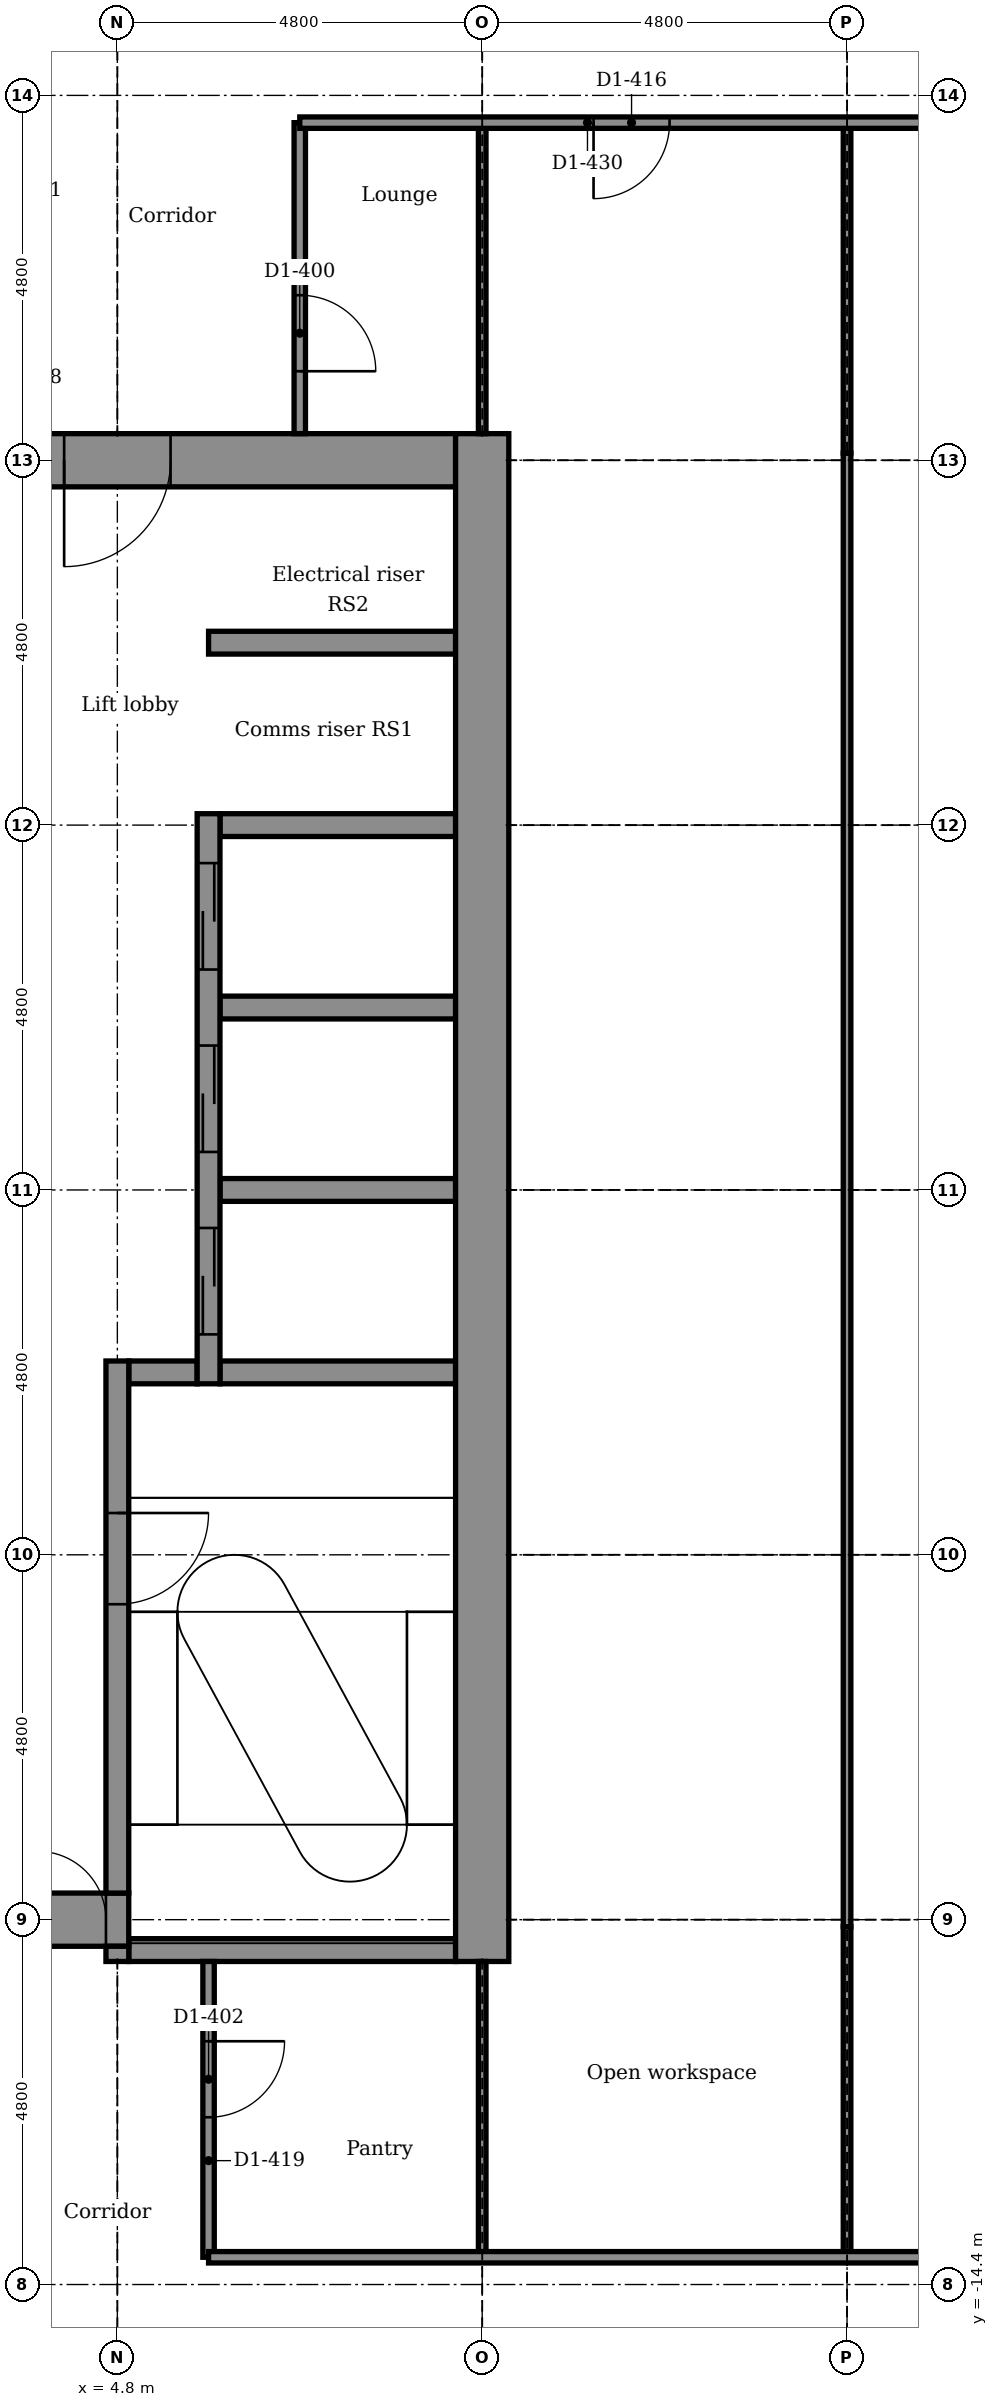
"""IFC4 building model, lengths in metres.
Left out: names, types, materials, properties, quantities, classifications, styles, units other than length and angle.
Written with IfcOpenShell. Run it as: python <this file> out.ifc"""

import sys

from ifc_helpers import new_model, si_unit, direction, frame, frame_2d, origin, place, context, subcontext, project, spatial, rectangle, extrude, element, fill, save


model = new_model("IFC4")
c1 = context("Model", 3, precision=1e-05, world=origin(), true_north=direction((0.0, 1.0)))
c2 = subcontext(c1, "Body", "Model", "MODEL_VIEW")
j1 = project(units=[si_unit("LENGTHUNIT", "METRE"), si_unit("PLANEANGLEUNIT", "RADIAN")], contexts=[c1])
p1 = place(None, origin())
s1 = spatial("IfcSite", under=j1, at=p1, CompositionType="ELEMENT")
p2 = place(p1, origin())
s2 = spatial("IfcBuilding", under=s1, at=p2, CompositionType="ELEMENT")
p3 = place(p2, frame((0.0, 0.0, 138.8)))
s3 = spatial("IfcBuildingStorey", under=s2, at=p3, CompositionType="ELEMENT", Elevation=138.8)
p4 = place(p3, frame((4.95, -10.0, -0.15), z_axis=(0.0, 0.0, 1.0), x_axis=(1.0, 0.0, 0.0)))
e1 = element("IfcWall", 1, at=p4, inside=s3, PredefinedType="STANDARD", context=c2, shape_type="SweptSolid", body=[
    extrude(rectangle(XDim=4.3, YDim=0.3, at=frame_2d((2.15, 0.0))), origin(), (0.0, 0.0, 1.0), 3.9),
])
p5 = place(p3, frame((-5.25, -9.6, -0.15), z_axis=(0.0, 0.0, 1.0), x_axis=(1.0, 0.0, 0.0)))
e2 = element("IfcWall", 2, at=p5, inside=s3, PredefinedType="SHEAR", context=c2, shape_type="SweptSolid", body=[
    extrude(rectangle(XDim=10.2, YDim=0.7, at=frame_2d((5.1, 0.0))), origin(), (0.0, 0.0, 1.0), 3.9),
])
p6 = place(p5, frame((9.0, 0.0, 0.15)))
e3 = element("IfcOpeningElement", 3, at=p6, cuts=e2, PredefinedType="OPENING", context=c2, shape_type="SweptSolid", body=[
    extrude(rectangle(XDim=0.9, YDim=2.1, at=frame_2d((0.45, 1.05))), frame((0.0, 0.36, 0.0), z_axis=(0.0, -1.0, 0.0), x_axis=(1.0, 0.0, 0.0)), (0.0, 0.0, 1.0), 0.72),
])
p7 = place(p3, frame((4.95, -2.4, -0.15), z_axis=(0.0, 0.0, 1.0), x_axis=(1.0, 0.0, 0.0)))
e4 = element("IfcWall", 4, at=p7, inside=s3, PredefinedType="STANDARD", context=c2, shape_type="SweptSolid", body=[
    extrude(rectangle(XDim=0.9, YDim=0.3, at=frame_2d((0.45, 0.0))), origin(), (0.0, 0.0, 1.0), 3.9),
])
for number, where, z_axis, x_axis in (
    (5, (6.15, -2.4, -0.15), (0.0, 0.0, 1.0), (1.0, 0.0, 0.0)),
    (6, (6.15, 0.0, -0.15), (0.0, 0.0, 1.0), (1.0, 0.0, 0.0)),
    (7, (6.15, 2.4, -0.15), (0.0, 0.0, 1.0), (1.0, 0.0, 0.0)),
    (8, (6.15, 4.8, -0.15), (0.0, 0.0, 1.0), (1.0, 0.0, 0.0)),
):
    element("IfcWall", number, at=place(p3, frame(where, z_axis=z_axis, x_axis=x_axis)), inside=s3, PredefinedType="STANDARD", context=c2, shape_type="SweptSolid", body=[
        extrude(rectangle(XDim=3.1, YDim=0.3, at=frame_2d((1.55, 0.0))), origin(), (0.0, 0.0, 1.0), 3.9),
    ])
p8 = place(p3, frame((6.0, 7.2, -0.15), z_axis=(0.0, 0.0, 1.0), x_axis=(1.0, 0.0, 0.0)))
e9 = element("IfcWall", 9, at=p8, inside=s3, PredefinedType="STANDARD", context=c2, shape_type="SweptSolid", body=[
    extrude(rectangle(XDim=3.25, YDim=0.3, at=frame_2d((1.625, 0.0))), origin(), (0.0, 0.0, 1.0), 3.9),
])
p9 = place(p3, frame((-5.25, 9.6, -0.15), z_axis=(0.0, 0.0, 1.0), x_axis=(1.0, 0.0, 0.0)))
e10 = element("IfcWall", 10, at=p9, inside=s3, PredefinedType="SHEAR", context=c2, shape_type="SweptSolid", body=[
    extrude(rectangle(XDim=14.5, YDim=0.7, at=frame_2d((7.25, 0.0))), origin(), (0.0, 0.0, 1.0), 3.9),
])
p10 = place(p9, frame((9.35, 0.0, 0.15)))
e11 = element("IfcOpeningElement", 11, at=p10, cuts=e10, PredefinedType="OPENING", context=c2, shape_type="SweptSolid", body=[
    extrude(rectangle(XDim=1.4, YDim=2.1, at=frame_2d((0.7, 1.05))), frame((0.0, 0.36, 0.0), z_axis=(0.0, -1.0, 0.0), x_axis=(1.0, 0.0, 0.0)), (0.0, 0.0, 1.0), 0.72),
])
p11 = place(p3, frame((4.8, -10.15, -0.15), z_axis=(0.0, 0.0, 1.0), x_axis=(0.0, 1.0, 0.0)))
e12 = element("IfcWall", 12, at=p11, inside=s3, PredefinedType="STANDARD", context=c2, shape_type="SweptSolid", body=[
    extrude(rectangle(XDim=0.2, YDim=0.3, at=frame_2d((0.1, 0.0))), origin(), (0.0, 0.0, 1.0), 3.9),
])
p12 = place(p3, frame((4.8, -9.25, -0.15), z_axis=(0.0, 0.0, 1.0), x_axis=(0.0, 1.0, 0.0)))
e13 = element("IfcWall", 13, at=p12, inside=s3, PredefinedType="STANDARD", context=c2, shape_type="SweptSolid", body=[
    extrude(rectangle(XDim=7.0, YDim=0.3, at=frame_2d((3.5, 0.0))), origin(), (0.0, 0.0, 1.0), 3.9),
])
p13 = place(p12, frame((3.8, 0.0, 0.15)))
e14 = element("IfcOpeningElement", 14, at=p13, cuts=e13, PredefinedType="OPENING", context=c2, shape_type="SweptSolid", body=[
    extrude(rectangle(XDim=1.2, YDim=2.1, at=frame_2d((0.6, 1.05))), frame((0.0, 0.16, 0.0), z_axis=(0.0, -1.0, 0.0), x_axis=(1.0, 0.0, 0.0)), (0.0, 0.0, 1.0), 0.32),
])
p14 = place(p3, frame((6.0, -2.55, -0.15), z_axis=(0.0, 0.0, 1.0), x_axis=(0.0, 1.0, 0.0)))
e15 = element("IfcWall", 15, at=p14, inside=s3, PredefinedType="STANDARD", context=c2, shape_type="SweptSolid", body=[
    extrude(rectangle(XDim=7.5, YDim=0.3, at=frame_2d((3.75, 0.0))), origin(), (0.0, 0.0, 1.0), 3.9),
])
p15 = place(p14, frame((0.65, 0.0, 0.15)))
e16 = element("IfcOpeningElement", 16, at=p15, cuts=e15, PredefinedType="OPENING", context=c2, shape_type="SweptSolid", body=[
    extrude(rectangle(XDim=1.4, YDim=2.1, at=frame_2d((0.7, 1.05))), frame((0.0, 0.16, 0.0), z_axis=(0.0, -1.0, 0.0), x_axis=(1.0, 0.0, 0.0)), (0.0, 0.0, 1.0), 0.32),
])
p16 = place(p14, frame((3.05, 0.0, 0.15)))
e17 = element("IfcOpeningElement", 17, at=p16, cuts=e15, PredefinedType="OPENING", context=c2, shape_type="SweptSolid", body=[
    extrude(rectangle(XDim=1.4, YDim=2.1, at=frame_2d((0.7, 1.05))), frame((0.0, 0.16, 0.0), z_axis=(0.0, -1.0, 0.0), x_axis=(1.0, 0.0, 0.0)), (0.0, 0.0, 1.0), 0.32),
])
p17 = place(p14, frame((5.45, 0.0, 0.15)))
e18 = element("IfcOpeningElement", 18, at=p17, cuts=e15, PredefinedType="OPENING", context=c2, shape_type="SweptSolid", body=[
    extrude(rectangle(XDim=1.4, YDim=2.1, at=frame_2d((0.7, 1.05))), frame((0.0, 0.16, 0.0), z_axis=(0.0, -1.0, 0.0), x_axis=(1.0, 0.0, 0.0)), (0.0, 0.0, 1.0), 0.32),
])
p18 = place(p3, frame((9.6, -10.15, -0.15), z_axis=(0.0, 0.0, 1.0), x_axis=(0.0, 1.0, 0.0)))
e19 = element("IfcWall", 19, at=p18, inside=s3, PredefinedType="SHEAR", context=c2, shape_type="SweptSolid", body=[
    extrude(rectangle(XDim=20.1, YDim=0.7, at=frame_2d((10.05, 0.0))), origin(), (0.0, 0.0, 1.0), 3.9),
])
p19 = place(p3, frame((14.4, -9.694, 0.0), z_axis=(0.0, 0.0, 1.0), x_axis=(0.0, 1.0, 0.0)))
e20 = element("IfcWall", 20, at=p19, inside=s3, PredefinedType="PARTITIONING", context=c2, shape_type="SweptSolid", body=[
    extrude(rectangle(XDim=19.387, YDim=0.1, at=frame_2d((9.694, 0.0))), origin(), (0.0, 0.0, 1.0), 3.75),
])
for number, where, z_axis, x_axis in (
    (21, (14.4, -14.042, 0.0), (0.0, 0.0, 1.0), (0.0, 1.0, 0.0)),
    (22, (14.4, 9.694, 0.0), (0.0, 0.0, 1.0), (0.0, 1.0, 0.0)),
):
    element("IfcWall", number, at=place(p3, frame(where, z_axis=z_axis, x_axis=x_axis)), inside=s3, PredefinedType="PARTITIONING", context=c2, shape_type="SweptSolid", body=[
        extrude(rectangle(XDim=4.348, YDim=0.1, at=frame_2d((2.174, 0.0))), origin(), (0.0, 0.0, 1.0), 3.066),
    ])
p20 = place(p3, frame((9.6, -14.042, 0.0), z_axis=(0.0, 0.0, 1.0), x_axis=(0.0, 1.0, 0.0)))
e23 = element("IfcWall", 23, at=p20, inside=s3, PredefinedType="PARTITIONING", context=c2, shape_type="SweptSolid", body=[
    extrude(rectangle(XDim=3.892, YDim=0.1, at=frame_2d((1.946, 0.0))), origin(), (0.0, 0.0, 1.0), 3.066),
])
p21 = place(p3, frame((9.6, 9.95, 0.0), z_axis=(0.0, 0.0, 1.0), x_axis=(0.0, 1.0, 0.0)))
e24 = element("IfcWall", 24, at=p21, inside=s3, PredefinedType="PARTITIONING", context=c2, shape_type="SweptSolid", body=[
    extrude(rectangle(XDim=4.092, YDim=0.1, at=frame_2d((2.046, 0.0))), origin(), (0.0, 0.0, 1.0), 3.066),
])
p22 = place(p3, frame((7.2, 9.95, 0.0), z_axis=(0.0, 0.0, 1.0), x_axis=(0.0, 1.0, 0.0)))
e25 = element("IfcWall", 25, at=p22, inside=s3, PredefinedType="PARTITIONING", context=c2, shape_type="SweptSolid", body=[
    extrude(rectangle(XDim=4.092, YDim=0.15, at=frame_2d((2.046, 0.0))), origin(), (0.0, 0.0, 1.0), 3.75),
])
p23 = place(p22, frame((0.821, 0.0, 0.0)))
e26 = element("IfcOpeningElement", 26, at=p23, cuts=e25, PredefinedType="OPENING", context=c2, shape_type="SweptSolid", body=[
    extrude(rectangle(XDim=1.0, YDim=2.1, at=frame_2d((0.5, 1.05))), frame((0.0, 0.085, 0.0), z_axis=(0.0, -1.0, 0.0), x_axis=(1.0, 0.0, 0.0)), (0.0, 0.0, 1.0), 0.17),
])
p24 = place(p3, frame((6.0, -14.042, 0.0), z_axis=(0.0, 0.0, 1.0), x_axis=(0.0, 1.0, 0.0)))
e27 = element("IfcWall", 27, at=p24, inside=s3, PredefinedType="PARTITIONING", context=c2, shape_type="SweptSolid", body=[
    extrude(rectangle(XDim=3.892, YDim=0.15, at=frame_2d((1.946, 0.0))), origin(), (0.0, 0.0, 1.0), 3.75),
])
p25 = place(p24, frame((1.842, 0.0, 0.0)))
e28 = element("IfcOpeningElement", 28, at=p25, cuts=e27, PredefinedType="OPENING", context=c2, shape_type="SweptSolid", body=[
    extrude(rectangle(XDim=1.0, YDim=2.1, at=frame_2d((0.5, 1.05))), frame((0.0, 0.085, 0.0), z_axis=(0.0, -1.0, 0.0), x_axis=(1.0, 0.0, 0.0)), (0.0, 0.0, 1.0), 0.17),
])
p26 = place(p3, frame((6.0, -14.042, 0.0), z_axis=(0.0, 0.0, 1.0), x_axis=(1.0, 0.0, 0.0)))
e29 = element("IfcWall", 29, at=p26, inside=s3, PredefinedType="PARTITIONING", context=c2, shape_type="SweptSolid", body=[
    extrude(rectangle(XDim=12.823, YDim=0.15, at=frame_2d((6.411, 0.0))), origin(), (0.0, 0.0, 1.0), 3.75),
])
p27 = place(p3, frame((7.2, 14.042, 0.0), z_axis=(0.0, 0.0, 1.0), x_axis=(1.0, 0.0, 0.0)))
e30 = element("IfcWall", 30, at=p27, inside=s3, PredefinedType="PARTITIONING", context=c2, shape_type="SweptSolid", body=[
    extrude(rectangle(XDim=9.821, YDim=0.15, at=frame_2d((4.911, 0.0))), origin(), (0.0, 0.0, 1.0), 3.75),
])
p28 = place(p27, frame((3.865, 0.0, 0.0)))
e31 = element("IfcOpeningElement", 31, at=p28, cuts=e30, PredefinedType="OPENING", context=c2, shape_type="SweptSolid", body=[
    extrude(rectangle(XDim=1.0, YDim=2.1, at=frame_2d((0.5, 1.05))), frame((0.0, 0.085, 0.0), z_axis=(0.0, -1.0, 0.0), x_axis=(1.0, 0.0, 0.0)), (0.0, 0.0, 1.0), 0.17),
])
p29 = place(p23, frame((1.0, 0.0, 0.0), z_axis=(0.0, 0.0, 1.0), x_axis=(-1.0, 0.0, 0.0)))
e32 = element("IfcDoor", 32, at=p29, inside=s3, OperationType="SINGLE_SWING_LEFT", PredefinedType="DOOR", context=c2, shape_type="SweptSolid", body=[
    extrude(rectangle(XDim=1.0, YDim=2.1, at=frame_2d((0.5, 1.05))), frame((0.0, 0.025, 0.0), z_axis=(0.0, -1.0, 0.0), x_axis=(1.0, 0.0, 0.0)), (0.0, 0.0, 1.0), 0.05),
])
fill(e26, e32)
p30 = place(p25, frame((1.0, 0.0, 0.0), z_axis=(0.0, 0.0, 1.0), x_axis=(-1.0, 0.0, 0.0)))
e33 = element("IfcDoor", 33, at=p30, inside=s3, OperationType="SINGLE_SWING_RIGHT", PredefinedType="DOOR", context=c2, shape_type="SweptSolid", body=[
    extrude(rectangle(XDim=1.0, YDim=2.1, at=frame_2d((0.5, 1.05))), frame((0.0, 0.025, 0.0), z_axis=(0.0, -1.0, 0.0), x_axis=(1.0, 0.0, 0.0)), (0.0, 0.0, 1.0), 0.05),
])
fill(e28, e33)
p31 = place(p28, frame((1.0, 0.0, 0.0), z_axis=(0.0, 0.0, 1.0), x_axis=(-1.0, 0.0, 0.0)))
e34 = element("IfcDoor", 34, at=p31, inside=s3, OperationType="SINGLE_SWING_LEFT", PredefinedType="DOOR", context=c2, shape_type="SweptSolid", body=[
    extrude(rectangle(XDim=1.0, YDim=2.1, at=frame_2d((0.5, 1.05))), frame((0.0, 0.025, 0.0), z_axis=(0.0, -1.0, 0.0), x_axis=(1.0, 0.0, 0.0)), (0.0, 0.0, 1.0), 0.05),
])
fill(e31, e34)
p32 = place(p15, origin())
e35 = element("IfcDoor", 35, at=p32, inside=s3, OperationType="DOUBLE_DOOR_SLIDING", PredefinedType="DOOR", context=c2, shape_type="SweptSolid", body=[
    extrude(rectangle(XDim=1.4, YDim=2.1, at=frame_2d((0.7, 1.05))), frame((0.0, 0.025, 0.0), z_axis=(0.0, -1.0, 0.0), x_axis=(1.0, 0.0, 0.0)), (0.0, 0.0, 1.0), 0.05),
])
fill(e16, e35)
p33 = place(p16, origin())
e36 = element("IfcDoor", 36, at=p33, inside=s3, OperationType="DOUBLE_DOOR_SLIDING", PredefinedType="DOOR", context=c2, shape_type="SweptSolid", body=[
    extrude(rectangle(XDim=1.4, YDim=2.1, at=frame_2d((0.7, 1.05))), frame((0.0, 0.025, 0.0), z_axis=(0.0, -1.0, 0.0), x_axis=(1.0, 0.0, 0.0)), (0.0, 0.0, 1.0), 0.05),
])
fill(e17, e36)
p34 = place(p17, origin())
e37 = element("IfcDoor", 37, at=p34, inside=s3, OperationType="DOUBLE_DOOR_SLIDING", PredefinedType="DOOR", context=c2, shape_type="SweptSolid", body=[
    extrude(rectangle(XDim=1.4, YDim=2.1, at=frame_2d((0.7, 1.05))), frame((0.0, 0.025, 0.0), z_axis=(0.0, -1.0, 0.0), x_axis=(1.0, 0.0, 0.0)), (0.0, 0.0, 1.0), 0.05),
])
fill(e18, e37)
p35 = place(p13, frame((1.2, 0.0, 0.0), z_axis=(0.0, 0.0, 1.0), x_axis=(-1.0, 0.0, 0.0)))
e38 = element("IfcDoor", 38, at=p35, inside=s3, OperationType="SINGLE_SWING_RIGHT", PredefinedType="DOOR", context=c2, shape_type="SweptSolid", body=[
    extrude(rectangle(XDim=1.2, YDim=2.1, at=frame_2d((0.6, 1.05))), frame((0.0, 0.025, 0.0), z_axis=(0.0, -1.0, 0.0), x_axis=(1.0, 0.0, 0.0)), (0.0, 0.0, 1.0), 0.05),
])
fill(e14, e38)
p36 = place(p10, frame((1.4, 0.0, 0.0), z_axis=(0.0, 0.0, 1.0), x_axis=(-1.0, 0.0, 0.0)))
e39 = element("IfcDoor", 39, at=p36, inside=s3, OperationType="SINGLE_SWING_LEFT", PredefinedType="DOOR", context=c2, shape_type="SweptSolid", body=[
    extrude(rectangle(XDim=1.4, YDim=2.1, at=frame_2d((0.7, 1.05))), frame((0.0, 0.025, 0.0), z_axis=(0.0, -1.0, 0.0), x_axis=(1.0, 0.0, 0.0)), (0.0, 0.0, 1.0), 0.05),
])
fill(e11, e39)
p37 = place(p6, origin())
e40 = element("IfcDoor", 40, at=p37, inside=s3, OperationType="SINGLE_SWING_LEFT", PredefinedType="DOOR", context=c2, shape_type="SweptSolid", body=[
    extrude(rectangle(XDim=0.9, YDim=2.1, at=frame_2d((0.45, 1.05))), frame((0.0, 0.025, 0.0), z_axis=(0.0, -1.0, 0.0), x_axis=(1.0, 0.0, 0.0)), (0.0, 0.0, 1.0), 0.05),
])
fill(e3, e40)
save(model, sys.argv[1])
